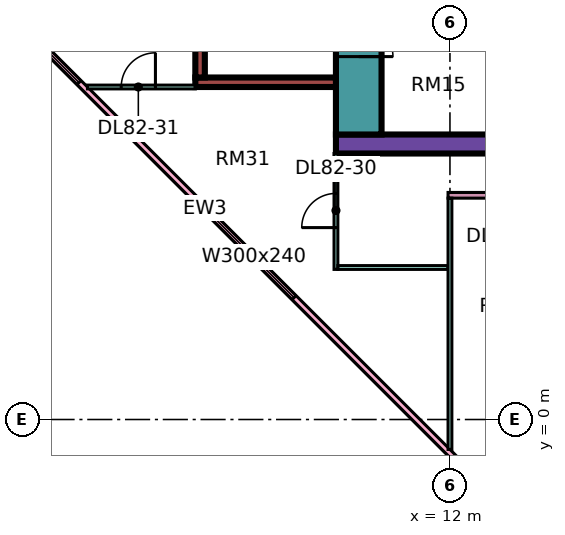
"""IFC4 building model, lengths in metres.
Left out: names, types, materials, properties, quantities, classifications, styles, units other than length and angle.
Written with IfcOpenShell. Run it as: python <this file> out.ifc"""

import sys

from ifc_helpers import new_model, si_unit, direction, frame, frame_2d, origin, place, context, subcontext, project, spatial, rectangle, extrude, element, fill, save


model = new_model("IFC4")
c1 = context("Model", 3, precision=1e-05, world=origin(), true_north=direction((0.0, 1.0)))
c2 = subcontext(c1, "Body", "Model", "MODEL_VIEW")
j1 = project(units=[si_unit("LENGTHUNIT", "METRE"), si_unit("PLANEANGLEUNIT", "RADIAN")], contexts=[c1])
p1 = place(None, origin())
s1 = spatial("IfcSite", under=j1, at=p1, CompositionType="ELEMENT")
p2 = place(p1, origin())
s2 = spatial("IfcBuilding", under=s1, at=p2, CompositionType="ELEMENT")
p3 = place(p2, frame((0.0, 0.0, 353.9)))
s3 = spatial("IfcBuildingStorey", under=s2, at=p3, CompositionType="ELEMENT", Elevation=353.9)
p4 = place(p3, frame((9.0, 7.25, 0.0), z_axis=(0.0, 0.0, 1.0), x_axis=(1.0, 0.0, 0.0)))
e1 = element("IfcWall", 1, at=p4, inside=s3, PredefinedType="SHEAR", context=c2, shape_type="SweptSolid", body=[
    extrude(rectangle(XDim=25.0, YDim=0.5, at=frame_2d((12.5, 0.0))), origin(), (0.0, 0.0, 1.0), 3.75),
])
p5 = place(p3, frame((9.6, 7.5, 0.0), z_axis=(0.0, 0.0, 1.0), x_axis=(0.0, 1.0, 0.0)))
e2 = element("IfcWall", 2, at=p5, inside=s3, PredefinedType="SHEAR", context=c2, shape_type="SweptSolid", body=[
    extrude(rectangle(XDim=12.0, YDim=1.2, at=frame_2d((6.0, 0.0))), origin(), (0.0, 0.0, 1.0), 3.75),
])
p6 = place(p5, frame((4.375, 0.0, 0.0)))
e3 = element("IfcOpeningElement", 3, at=p6, cuts=e2, PredefinedType="OPENING", context=c2, shape_type="SweptSolid", body=[
    extrude(rectangle(XDim=1.1, YDim=2.2, at=frame_2d((0.55, 1.1))), frame((0.0, 0.61, 0.0), z_axis=(0.0, -1.0, 0.0), x_axis=(1.0, 0.0, 0.0)), (0.0, 0.0, 1.0), 1.22),
])
p7 = place(p5, frame((6.875, 0.0, 0.0)))
e4 = element("IfcOpeningElement", 4, at=p7, cuts=e2, PredefinedType="OPENING", context=c2, shape_type="SweptSolid", body=[
    extrude(rectangle(XDim=1.1, YDim=2.2, at=frame_2d((0.55, 1.1))), frame((0.0, 0.61, 0.0), z_axis=(0.0, -1.0, 0.0), x_axis=(1.0, 0.0, 0.0)), (0.0, 0.0, 1.0), 1.22),
])
p8 = place(p5, frame((9.85, 0.0, 0.0)))
e5 = element("IfcOpeningElement", 5, at=p8, cuts=e2, PredefinedType="OPENING", context=c2, shape_type="SweptSolid", body=[
    extrude(rectangle(XDim=1.1, YDim=2.2, at=frame_2d((0.55, 1.1))), frame((0.0, 0.61, 0.0), z_axis=(0.0, -1.0, 0.0), x_axis=(1.0, 0.0, 0.0)), (0.0, 0.0, 1.0), 1.22),
])
p9 = place(p5, frame((2.05, 0.0, 0.0)))
e6 = element("IfcOpeningElement", 6, at=p9, cuts=e2, PredefinedType="OPENING", context=c2, shape_type="SweptSolid", body=[
    extrude(rectangle(XDim=0.9, YDim=2.1, at=frame_2d((0.45, 1.05))), frame((0.0, 0.61, 0.0), z_axis=(0.0, -1.0, 0.0), x_axis=(1.0, 0.0, 0.0)), (0.0, 0.0, 1.0), 1.22),
])
p10 = place(p3, frame((5.3, 8.875, 0.0), z_axis=(0.0, 0.0, 1.0), x_axis=(1.0, 0.0, 0.0)))
e7 = element("IfcWall", 7, at=p10, inside=s3, PredefinedType="SHEAR", context=c2, shape_type="SweptSolid", body=[
    extrude(rectangle(XDim=3.7, YDim=0.25, at=frame_2d((1.85, 0.0))), origin(), (0.0, 0.0, 1.0), 3.75),
])
p11 = place(p3, frame((5.425, 9.0, 0.0), z_axis=(0.0, 0.0, 1.0), x_axis=(0.0, 1.0, 0.0)))
e8 = element("IfcWall", 8, at=p11, inside=s3, PredefinedType="SHEAR", context=c2, shape_type="SweptSolid", body=[
    extrude(rectangle(XDim=4.0, YDim=0.25, at=frame_2d((2.0, 0.0))), origin(), (0.0, 0.0, 1.0), 3.75),
])
p12 = place(p3, frame((-1.447, 12.553, 0.0), z_axis=(0.0, 0.0, 1.0), x_axis=(0.707106781187, -0.707106781187, 0.0)))
e9 = element("IfcWall", 9, at=p12, inside=s3, PredefinedType="SOLIDWALL", context=c2, shape_type="SweptSolid", body=[
    extrude(rectangle(XDim=19.799, YDim=0.15, at=frame_2d((9.899, 0.0))), origin(), (0.0, 0.0, 1.0), 3.35),
])
p13 = place(p12, frame((2.212, 0.0, 0.45)))
e10 = element("IfcOpeningElement", 10, at=p13, cuts=e9, PredefinedType="OPENING", context=c2, shape_type="SweptSolid", body=[
    extrude(rectangle(XDim=3.0, YDim=2.4, at=frame_2d((1.5, 1.2))), frame((0.0, 0.085, 0.0), z_axis=(0.0, -1.0, 0.0), x_axis=(1.0, 0.0, 0.0)), (0.0, 0.0, 1.0), 0.17),
])
p14 = place(p12, frame((10.216, 0.0, 0.45)))
e11 = element("IfcOpeningElement", 11, at=p14, cuts=e9, PredefinedType="OPENING", context=c2, shape_type="SweptSolid", body=[
    extrude(rectangle(XDim=3.0, YDim=2.4, at=frame_2d((1.5, 1.2))), frame((0.0, 0.085, 0.0), z_axis=(0.0, -1.0, 0.0), x_axis=(1.0, 0.0, 0.0)), (0.0, 0.0, 1.0), 0.17),
])
p15 = place(p3, frame((2.461, 8.75, 0.0), z_axis=(0.0, 0.0, 1.0), x_axis=(1.0, 0.0, 0.0)))
e12 = element("IfcWall", 12, at=p15, inside=s3, PredefinedType="PARTITIONING", context=c2, shape_type="SweptSolid", body=[
    extrude(rectangle(XDim=2.839, YDim=0.1, at=frame_2d((1.419, 0.0))), origin(), (0.0, 0.0, 1.0), 3.35),
])
p16 = place(p15, frame((0.889, 0.0, 0.0)))
e13 = element("IfcOpeningElement", 13, at=p16, cuts=e12, PredefinedType="OPENING", context=c2, shape_type="SweptSolid", body=[
    extrude(rectangle(XDim=0.9, YDim=2.1, at=frame_2d((0.45, 1.05))), frame((0.0, 0.06, 0.0), z_axis=(0.0, -1.0, 0.0), x_axis=(1.0, 0.0, 0.0)), (0.0, 0.0, 1.0), 0.12),
])
p17 = place(p3, frame((9.0, 3.95, 0.0), z_axis=(0.0, 0.0, 1.0), x_axis=(0.0, 1.0, 0.0)))
e14 = element("IfcWall", 14, at=p17, inside=s3, PredefinedType="PARTITIONING", context=c2, shape_type="SweptSolid", body=[
    extrude(rectangle(XDim=3.05, YDim=0.1, at=frame_2d((1.525, 0.0))), origin(), (0.0, 0.0, 1.0), 3.35),
])
p18 = place(p17, frame((1.1, 0.0, 0.0)))
e15 = element("IfcOpeningElement", 15, at=p18, cuts=e14, PredefinedType="OPENING", context=c2, shape_type="SweptSolid", body=[
    extrude(rectangle(XDim=0.9, YDim=2.1, at=frame_2d((0.45, 1.05))), frame((0.0, 0.06, 0.0), z_axis=(0.0, -1.0, 0.0), x_axis=(1.0, 0.0, 0.0)), (0.0, 0.0, 1.0), 0.12),
])
p19 = place(p3, frame((9.05, 4.0, 0.0), z_axis=(0.0, 0.0, 1.0), x_axis=(1.0, 0.0, 0.0)))
e16 = element("IfcWall", 16, at=p19, inside=s3, PredefinedType="PARTITIONING", context=c2, shape_type="SweptSolid", body=[
    extrude(rectangle(XDim=2.9, YDim=0.1, at=frame_2d((1.45, 0.0))), origin(), (0.0, 0.0, 1.0), 3.35),
])
p20 = place(p3, frame((11.95, 5.9, 0.0), z_axis=(0.0, 0.0, 1.0), x_axis=(1.0, 0.0, 0.0)))
e17 = element("IfcWall", 17, at=p20, inside=s3, PredefinedType="PARTITIONING", context=c2, shape_type="SweptSolid", body=[
    extrude(rectangle(XDim=21.1, YDim=0.15, at=frame_2d((10.55, 0.0))), origin(), (0.0, 0.0, 1.0), 3.35),
])
p21 = place(p20, frame((1.1, 0.0, 0.0)))
e18 = element("IfcOpeningElement", 18, at=p21, cuts=e17, PredefinedType="OPENING", context=c2, shape_type="SweptSolid", body=[
    extrude(rectangle(XDim=0.9, YDim=2.1, at=frame_2d((0.45, 1.05))), frame((0.0, 0.085, 0.0), z_axis=(0.0, -1.0, 0.0), x_axis=(1.0, 0.0, 0.0)), (0.0, 0.0, 1.0), 0.17),
])
p22 = place(p20, frame((4.1, 0.0, 0.0)))
e19 = element("IfcOpeningElement", 19, at=p22, cuts=e17, PredefinedType="OPENING", context=c2, shape_type="SweptSolid", body=[
    extrude(rectangle(XDim=0.9, YDim=2.1, at=frame_2d((0.45, 1.05))), frame((0.0, 0.085, 0.0), z_axis=(0.0, -1.0, 0.0), x_axis=(1.0, 0.0, 0.0)), (0.0, 0.0, 1.0), 0.17),
])
p23 = place(p20, frame((10.1, 0.0, 0.0)))
e20 = element("IfcOpeningElement", 20, at=p23, cuts=e17, PredefinedType="OPENING", context=c2, shape_type="SweptSolid", body=[
    extrude(rectangle(XDim=0.9, YDim=2.1, at=frame_2d((0.45, 1.05))), frame((0.0, 0.085, 0.0), z_axis=(0.0, -1.0, 0.0), x_axis=(1.0, 0.0, 0.0)), (0.0, 0.0, 1.0), 0.17),
])
p24 = place(p3, frame((12.0, -0.788, 0.0), z_axis=(0.0, 0.0, 1.0), x_axis=(0.0, 1.0, 0.0)))
e21 = element("IfcWall", 21, at=p24, inside=s3, PredefinedType="PARTITIONING", context=c2, shape_type="SweptSolid", body=[
    extrude(rectangle(XDim=6.613, YDim=0.1, at=frame_2d((3.306, 0.0))), origin(), (0.0, 0.0, 1.0), 3.35),
])
p25 = place(p13, origin())
e22 = element("IfcWindow", 22, at=p25, inside=s3, PartitioningType="SINGLE_PANEL", PredefinedType="WINDOW", context=c2, shape_type="SweptSolid", body=[
    extrude(rectangle(XDim=3.0, YDim=2.4, at=frame_2d((1.5, 1.2))), frame((0.0, 0.03, 0.0), z_axis=(0.0, -1.0, 0.0), x_axis=(1.0, 0.0, 0.0)), (0.0, 0.0, 1.0), 0.06),
])
fill(e10, e22)
p26 = place(p14, origin())
e23 = element("IfcWindow", 23, at=p26, inside=s3, PartitioningType="SINGLE_PANEL", PredefinedType="WINDOW", context=c2, shape_type="SweptSolid", body=[
    extrude(rectangle(XDim=3.0, YDim=2.4, at=frame_2d((1.5, 1.2))), frame((0.0, 0.03, 0.0), z_axis=(0.0, -1.0, 0.0), x_axis=(1.0, 0.0, 0.0)), (0.0, 0.0, 1.0), 0.06),
])
fill(e11, e23)
p27 = place(p9, frame((0.9, 0.0, 0.0), z_axis=(0.0, 0.0, 1.0), x_axis=(-1.0, 0.0, 0.0)))
e24 = element("IfcDoor", 24, at=p27, inside=s3, OperationType="SINGLE_SWING_LEFT", PredefinedType="DOOR", context=c2, shape_type="SweptSolid", body=[
    extrude(rectangle(XDim=0.9, YDim=2.1, at=frame_2d((0.45, 1.05))), frame((0.0, 0.025, 0.0), z_axis=(0.0, -1.0, 0.0), x_axis=(1.0, 0.0, 0.0)), (0.0, 0.0, 1.0), 0.05),
])
fill(e6, e24)
p28 = place(p18, origin())
e25 = element("IfcDoor", 25, at=p28, inside=s3, OperationType="SINGLE_SWING_LEFT", PredefinedType="DOOR", context=c2, shape_type="SweptSolid", body=[
    extrude(rectangle(XDim=0.9, YDim=2.1, at=frame_2d((0.45, 1.05))), frame((0.0, 0.025, 0.0), z_axis=(0.0, -1.0, 0.0), x_axis=(1.0, 0.0, 0.0)), (0.0, 0.0, 1.0), 0.05),
])
fill(e15, e25)
p29 = place(p16, frame((0.9, 0.0, 0.0), z_axis=(0.0, 0.0, 1.0), x_axis=(-1.0, 0.0, 0.0)))
e26 = element("IfcDoor", 26, at=p29, inside=s3, OperationType="SINGLE_SWING_RIGHT", PredefinedType="DOOR", context=c2, shape_type="SweptSolid", body=[
    extrude(rectangle(XDim=0.9, YDim=2.1, at=frame_2d((0.45, 1.05))), frame((0.0, 0.025, 0.0), z_axis=(0.0, -1.0, 0.0), x_axis=(1.0, 0.0, 0.0)), (0.0, 0.0, 1.0), 0.05),
])
fill(e13, e26)
save(model, sys.argv[1])
